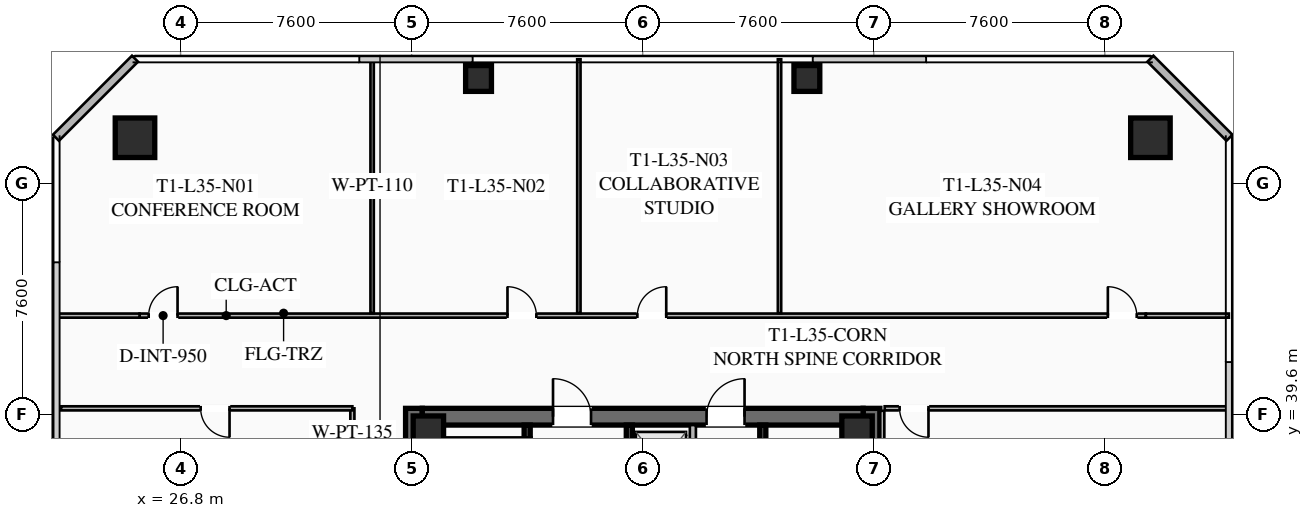
"""IFC4 building model, lengths in metres.
Left out: names, types, materials, properties, quantities, classifications, styles, units other than length and angle.
Written with IfcOpenShell. Run it as: python <this file> out.ifc"""

import sys

from ifc_helpers import new_model, si_unit, direction, frame, frame_2d, origin, origin_2d, place, context, subcontext, project, spatial, rectangle, hollow_rectangle, extrude, element, fill, save


model = new_model("IFC4")
c1 = context("Model", 3, precision=1e-05, world=origin(), true_north=direction((0.0, 1.0)))
c2 = subcontext(c1, "Body", "Model", "MODEL_VIEW")
j1 = project(units=[si_unit("LENGTHUNIT", "METRE"), si_unit("PLANEANGLEUNIT", "RADIAN")], contexts=[c1])
p1 = place(None, origin())
s1 = spatial("IfcSite", under=j1, at=p1, CompositionType="ELEMENT")
p2 = place(p1, origin())
s2 = spatial("IfcBuilding", under=s1, at=p2, CompositionType="ELEMENT")
p3 = place(p2, frame((0.0, 0.0, 132.15)))
s3 = spatial("IfcBuildingStorey", under=s2, at=p3, CompositionType="ELEMENT", Elevation=132.15)
for number, where, z_axis, x_axis in (
    (1, (34.475, 24.2, 0.0), (0.0, 0.0, 1.0), (0.0, 1.0, 0.0)),
    (2, (49.525, 39.8, 0.0), (0.0, 0.0, 1.0), (0.0, -1.0, 0.0)),
):
    element("IfcWall", number, at=place(p3, frame(where, z_axis=z_axis, x_axis=x_axis)), inside=s3, PredefinedType="SHEAR", context=c2, shape_type="SweptSolid", body=[
        extrude(rectangle(XDim=15.6, YDim=0.55, at=frame_2d((7.8, 0.0))), origin(), (0.0, 0.0, 1.0), 3.55),
    ])
p4 = place(p3, frame((34.75, 39.525, 0.0), z_axis=(0.0, 0.0, 1.0), x_axis=(1.0, 0.0, 0.0)))
e3 = element("IfcWall", 3, at=p4, inside=s3, PredefinedType="SHEAR", context=c2, shape_type="SweptSolid", body=[
    extrude(rectangle(XDim=14.5, YDim=0.55, at=frame_2d((7.25, 0.0))), origin(), (0.0, 0.0, 1.0), 3.55),
])
p5 = place(p4, frame((4.3, 0.0, 0.0)))
e4 = element("IfcOpeningElement", 4, at=p5, cuts=e3, PredefinedType="OPENING", context=c2, shape_type="SweptSolid", body=[
    extrude(rectangle(XDim=1.25, YDim=2.25, at=frame_2d((0.625, 1.125))), frame((0.0, 0.285, 0.0), z_axis=(0.0, -1.0, 0.0), x_axis=(1.0, 0.0, 0.0)), (0.0, 0.0, 1.0), 0.57),
])
p6 = place(p4, frame((9.35, 0.0, 0.0)))
e5 = element("IfcOpeningElement", 5, at=p6, cuts=e3, PredefinedType="OPENING", context=c2, shape_type="SweptSolid", body=[
    extrude(rectangle(XDim=1.25, YDim=2.25, at=frame_2d((0.625, 1.125))), frame((0.0, 0.285, 0.0), z_axis=(0.0, -1.0, 0.0), x_axis=(1.0, 0.0, 0.0)), (0.0, 0.0, 1.0), 0.57),
])
for number, where, z_axis, x_axis in (
    (6, (49.05, 39.05, 0.0), (0.0, 0.0, 1.0), (1.0, 0.0, 0.0)),
    (7, (34.95, 39.05, 0.0), (0.0, 0.0, 1.0), (1.0, 0.0, 0.0)),
):
    element("IfcColumn", number, at=place(p3, frame(where, z_axis=z_axis, x_axis=x_axis)), inside=s3, PredefinedType="COLUMN", context=c2, shape_type="SweptSolid", body=[
        extrude(hollow_rectangle(XDim=1.0, YDim=1.0, WallThickness=0.04, at=origin_2d()), origin(), (0.0, 0.0, 1.0), 3.37),
    ])
for number, where, z_axis, x_axis in (
    (8, (58.7, 48.7, 0.0), (0.0, 0.0, 1.0), (1.0, 0.0, 0.0)),
    (9, (25.3, 48.7, 0.0), (0.0, 0.0, 1.0), (1.0, 0.0, 0.0)),
):
    element("IfcColumn", number, at=place(p3, frame(where, z_axis=z_axis, x_axis=x_axis)), inside=s3, PredefinedType="COLUMN", context=c2, shape_type="SweptSolid", body=[
        extrude(hollow_rectangle(XDim=1.3, YDim=1.3, WallThickness=0.05, at=origin_2d()), origin(), (0.0, 0.0, 1.0), 3.37),
    ])
for number, where, z_axis, x_axis in (
    (10, (47.4, 50.65, 0.0), (0.0, 0.0, 1.0), (1.0, 0.0, 0.0)),
    (11, (36.6, 50.65, 0.0), (0.0, 0.0, 1.0), (1.0, 0.0, 0.0)),
):
    element("IfcColumn", number, at=place(p3, frame(where, z_axis=z_axis, x_axis=x_axis)), inside=s3, PredefinedType="COLUMN", context=c2, shape_type="SweptSolid", body=[
        extrude(hollow_rectangle(XDim=0.85, YDim=0.85, WallThickness=0.035, at=origin_2d()), origin(), (0.0, 0.0, 1.0), 3.37),
    ])
for number, where, z_axis, x_axis in (
    (12, (22.7, 48.7, 0.0), (0.0, 0.0, 1.0), (0.707, 0.707, 0.0)),
    (13, (58.7, 51.3, 0.0), (0.0, 0.0, 1.0), (0.707, -0.707, 0.0)),
):
    element("IfcWall", number, at=place(p3, frame(where, z_axis=z_axis, x_axis=x_axis)), inside=s3, PredefinedType="SOLIDWALL", context=c2, shape_type="SweptSolid", body=[
        extrude(rectangle(XDim=3.677, YDim=0.28, at=frame_2d((1.838, 0.0))), origin(), (0.0, 0.0, 1.0), 3.37),
    ])
p7 = place(p3, frame((38.2, 31.2, 0.0), z_axis=(0.0, 0.0, 1.0), x_axis=(0.0, 1.0, 0.0)))
e14 = element("IfcWall", 14, at=p7, inside=s3, PredefinedType="SHEAR", context=c2, shape_type="SweptSolid", body=[
    extrude(rectangle(XDim=8.05, YDim=0.2, at=frame_2d((4.025, 0.0))), origin(), (0.0, 0.0, 1.0), 3.37),
])
p8 = place(p7, frame((0.45, 0.0, 0.0)))
e15 = element("IfcOpeningElement", 15, at=p8, cuts=e14, PredefinedType="OPENING", context=c2, shape_type="SweptSolid", body=[
    extrude(rectangle(XDim=1.15, YDim=2.2, at=frame_2d((0.575, 1.1))), frame((0.0, 0.11, 0.0), z_axis=(0.0, -1.0, 0.0), x_axis=(1.0, 0.0, 0.0)), (0.0, 0.0, 1.0), 0.22),
])
p9 = place(p3, frame((41.56, 24.75, 0.0), z_axis=(0.0, 0.0, 1.0), x_axis=(0.0, 1.0, 0.0)))
e16 = element("IfcWall", 16, at=p9, inside=s3, PredefinedType="SHEAR", context=c2, shape_type="SweptSolid", body=[
    extrude(rectangle(XDim=14.5, YDim=0.2, at=frame_2d((7.25, 0.0))), origin(), (0.0, 0.0, 1.0), 3.37),
])
p10 = place(p3, frame((45.95, 39.25, 0.0), z_axis=(0.0, 0.0, 1.0), x_axis=(0.0, -1.0, 0.0)))
e17 = element("IfcWall", 17, at=p10, inside=s3, PredefinedType="SHEAR", context=c2, shape_type="SweptSolid", body=[
    extrude(rectangle(XDim=6.45, YDim=0.2, at=frame_2d((3.225, 0.0))), origin(), (0.0, 0.0, 1.0), 3.37),
])
p11 = place(p3, frame((43.65, 32.35, 0.0), z_axis=(0.0, 0.0, 1.0), x_axis=(0.0, 1.0, 0.0)))
e18 = element("IfcWall", 18, at=p11, inside=s3, PredefinedType="SOLIDWALL", context=c2, shape_type="SweptSolid", body=[
    extrude(rectangle(XDim=6.9, YDim=0.2, at=frame_2d((3.45, 0.0))), origin(), (0.0, 0.0, 1.0), 3.37),
])
p12 = place(p11, frame((0.575, 0.0, 0.0)))
e19 = element("IfcOpeningElement", 19, at=p12, cuts=e18, PredefinedType="OPENING", context=c2, shape_type="SweptSolid", body=[
    extrude(rectangle(XDim=1.1, YDim=2.2, at=frame_2d((0.55, 1.1))), frame((0.0, 0.11, 0.0), z_axis=(0.0, -1.0, 0.0), x_axis=(1.0, 0.0, 0.0)), (0.0, 0.0, 1.0), 0.22),
])
p13 = place(p11, frame((2.825, 0.0, 0.0)))
e20 = element("IfcOpeningElement", 20, at=p13, cuts=e18, PredefinedType="OPENING", context=c2, shape_type="SweptSolid", body=[
    extrude(rectangle(XDim=1.1, YDim=2.2, at=frame_2d((0.55, 1.1))), frame((0.0, 0.11, 0.0), z_axis=(0.0, -1.0, 0.0), x_axis=(1.0, 0.0, 0.0)), (0.0, 0.0, 1.0), 0.22),
])
p14 = place(p11, frame((5.075, 0.0, 0.0)))
e21 = element("IfcOpeningElement", 21, at=p14, cuts=e18, PredefinedType="OPENING", context=c2, shape_type="SweptSolid", body=[
    extrude(rectangle(XDim=1.1, YDim=2.2, at=frame_2d((0.55, 1.1))), frame((0.0, 0.11, 0.0), z_axis=(0.0, -1.0, 0.0), x_axis=(1.0, 0.0, 0.0)), (0.0, 0.0, 1.0), 0.22),
])
p15 = place(p3, frame((32.45, 35.4, 0.0), z_axis=(0.0, 0.0, 1.0), x_axis=(0.0, 1.0, 0.0)))
e22 = element("IfcWall", 22, at=p15, inside=s3, PredefinedType="PARTITIONING", context=c2, shape_type="SweptSolid", body=[
    extrude(rectangle(XDim=4.4, YDim=0.135, at=frame_2d((2.2, 0.0))), origin(), (0.0, 0.0, 1.0), 2.723),
])
p16 = place(p3, frame((25.45, 42.85, 0.0), z_axis=(0.0, 0.0, 1.0), x_axis=(1.0, 0.0, 0.0)))
e23 = element("IfcWall", 23, at=p16, inside=s3, PredefinedType="PARTITIONING", context=c2, shape_type="SweptSolid", body=[
    extrude(rectangle(XDim=33.1, YDim=0.135, at=frame_2d((16.55, 0.0))), origin(), (0.0, 0.0, 1.0), 2.723),
])
p17 = place(p16, frame((0.3, 0.0, 0.0)))
e24 = element("IfcOpeningElement", 24, at=p17, cuts=e23, PredefinedType="OPENING", context=c2, shape_type="SweptSolid", body=[
    extrude(rectangle(XDim=0.95, YDim=2.05, at=frame_2d((0.475, 1.025))), frame((0.0, 0.077, 0.0), z_axis=(0.0, -1.0, 0.0), x_axis=(1.0, 0.0, 0.0)), (0.0, 0.0, 1.0), 0.155),
])
p18 = place(p16, frame((12.102, 0.0, 0.0)))
e25 = element("IfcOpeningElement", 25, at=p18, cuts=e23, PredefinedType="OPENING", context=c2, shape_type="SweptSolid", body=[
    extrude(rectangle(XDim=0.95, YDim=2.05, at=frame_2d((0.475, 1.025))), frame((0.0, 0.077, 0.0), z_axis=(0.0, -1.0, 0.0), x_axis=(1.0, 0.0, 0.0)), (0.0, 0.0, 1.0), 0.155),
])
p19 = place(p16, frame((16.374, 0.0, 0.0)))
e26 = element("IfcOpeningElement", 26, at=p19, cuts=e23, PredefinedType="OPENING", context=c2, shape_type="SweptSolid", body=[
    extrude(rectangle(XDim=0.95, YDim=2.05, at=frame_2d((0.475, 1.025))), frame((0.0, 0.077, 0.0), z_axis=(0.0, -1.0, 0.0), x_axis=(1.0, 0.0, 0.0)), (0.0, 0.0, 1.0), 0.155),
])
p20 = place(p16, frame((31.85, 0.0, 0.0)))
e27 = element("IfcOpeningElement", 27, at=p20, cuts=e23, PredefinedType="OPENING", context=c2, shape_type="SweptSolid", body=[
    extrude(rectangle(XDim=0.95, YDim=2.05, at=frame_2d((0.475, 1.025))), frame((0.0, 0.077, 0.0), z_axis=(0.0, -1.0, 0.0), x_axis=(1.0, 0.0, 0.0)), (0.0, 0.0, 1.0), 0.155),
])
for number, where, z_axis, x_axis in (
    (28, (22.72, 42.85, 0.0), (0.0, 0.0, 1.0), (1.0, 0.0, 0.0)),
    (29, (58.55, 42.85, 0.0), (0.0, 0.0, 1.0), (1.0, 0.0, 0.0)),
):
    element("IfcWall", number, at=place(p3, frame(where, z_axis=z_axis, x_axis=x_axis)), inside=s3, PredefinedType="PARTITIONING", context=c2, shape_type="SweptSolid", body=[
        extrude(rectangle(XDim=2.73, YDim=0.135, at=frame_2d((1.365, 0.0))), origin(), (0.0, 0.0, 1.0), 2.723),
    ])
for number, where, z_axis, x_axis in (
    (30, (33.1, 42.93, 0.0), (0.0, 0.0, 1.0), (0.0, 1.0, 0.0)),
    (31, (39.9, 42.93, 0.0), (0.0, 0.0, 1.0), (0.0, 1.0, 0.0)),
    (32, (46.5, 42.93, 0.0), (0.0, 0.0, 1.0), (0.0, 1.0, 0.0)),
):
    element("IfcWall", number, at=place(p3, frame(where, z_axis=z_axis, x_axis=x_axis)), inside=s3, PredefinedType="PARTITIONING", context=c2, shape_type="SweptSolid", body=[
        extrude(rectangle(XDim=8.35, YDim=0.11, at=frame_2d((4.175, 0.0))), origin(), (0.0, 0.0, 1.0), 2.723),
    ])
p21 = place(p3, frame((49.88, 39.72, 0.0), z_axis=(0.0, 0.0, 1.0), x_axis=(0.0, -1.0, 0.0)))
e33 = element("IfcWall", 33, at=p21, inside=s3, PredefinedType="PARTITIONING", context=c2, shape_type="SweptSolid", body=[
    extrude(rectangle(XDim=15.44, YDim=0.135, at=frame_2d((7.72, 0.0))), origin(), (0.0, 0.0, 1.0), 2.723),
])
p22 = place(p3, frame((61.28, 39.8, 0.0), z_axis=(0.0, 0.0, 1.0), x_axis=(-1.0, 0.0, 0.0)))
e34 = element("IfcWall", 34, at=p22, inside=s3, PredefinedType="PARTITIONING", context=c2, shape_type="SweptSolid", body=[
    extrude(rectangle(XDim=11.32, YDim=0.135, at=frame_2d((5.66, 0.0))), origin(), (0.0, 0.0, 1.0), 2.723),
])
p23 = place(p22, frame((9.88, 0.0, 0.0)))
e35 = element("IfcOpeningElement", 35, at=p23, cuts=e34, PredefinedType="OPENING", context=c2, shape_type="SweptSolid", body=[
    extrude(rectangle(XDim=0.95, YDim=2.05, at=frame_2d((0.475, 1.025))), frame((0.0, 0.077, 0.0), z_axis=(0.0, -1.0, 0.0), x_axis=(1.0, 0.0, 0.0)), (0.0, 0.0, 1.0), 0.155),
])
p24 = place(p3, frame((32.45, 39.8, 0.0), z_axis=(0.0, 0.0, 1.0), x_axis=(-1.0, 0.0, 0.0)))
e36 = element("IfcWall", 36, at=p24, inside=s3, PredefinedType="PARTITIONING", context=c2, shape_type="SweptSolid", body=[
    extrude(rectangle(XDim=9.58, YDim=0.135, at=frame_2d((4.79, 0.0))), origin(), (0.0, 0.0, 1.0), 2.723),
])
p25 = place(p24, frame((4.04, 0.0, 0.0)))
e37 = element("IfcOpeningElement", 37, at=p25, cuts=e36, PredefinedType="OPENING", context=c2, shape_type="SweptSolid", body=[
    extrude(rectangle(XDim=0.95, YDim=2.05, at=frame_2d((0.475, 1.025))), frame((0.0, 0.077, 0.0), z_axis=(0.0, -1.0, 0.0), x_axis=(1.0, 0.0, 0.0)), (0.0, 0.0, 1.0), 0.155),
])
p26 = place(p5, origin())
e38 = element("IfcDoor", 38, at=p26, inside=s3, OperationType="SINGLE_SWING_LEFT", PredefinedType="DOOR", context=c2, shape_type="SweptSolid", body=[
    extrude(rectangle(XDim=1.25, YDim=2.25, at=frame_2d((0.625, 1.125))), frame((0.0, 0.025, 0.0), z_axis=(0.0, -1.0, 0.0), x_axis=(1.0, 0.0, 0.0)), (0.0, 0.0, 1.0), 0.05),
])
fill(e4, e38)
p27 = place(p6, origin())
e39 = element("IfcDoor", 39, at=p27, inside=s3, OperationType="SINGLE_SWING_RIGHT", PredefinedType="DOOR", context=c2, shape_type="SweptSolid", body=[
    extrude(rectangle(XDim=1.25, YDim=2.25, at=frame_2d((0.625, 1.125))), frame((0.0, 0.025, 0.0), z_axis=(0.0, -1.0, 0.0), x_axis=(1.0, 0.0, 0.0)), (0.0, 0.0, 1.0), 0.05),
])
fill(e5, e39)
p28 = place(p17, origin())
e40 = element("IfcDoor", 40, at=p28, inside=s3, OperationType="SINGLE_SWING_RIGHT", PredefinedType="DOOR", context=c2, shape_type="SweptSolid", body=[
    extrude(rectangle(XDim=0.95, YDim=2.05, at=frame_2d((0.475, 1.025))), frame((0.0, 0.025, 0.0), z_axis=(0.0, -1.0, 0.0), x_axis=(1.0, 0.0, 0.0)), (0.0, 0.0, 1.0), 0.05),
])
fill(e24, e40)
p29 = place(p18, origin())
e41 = element("IfcDoor", 41, at=p29, inside=s3, OperationType="SINGLE_SWING_LEFT", PredefinedType="DOOR", context=c2, shape_type="SweptSolid", body=[
    extrude(rectangle(XDim=0.95, YDim=2.05, at=frame_2d((0.475, 1.025))), frame((0.0, 0.025, 0.0), z_axis=(0.0, -1.0, 0.0), x_axis=(1.0, 0.0, 0.0)), (0.0, 0.0, 1.0), 0.05),
])
fill(e25, e41)
p30 = place(p19, origin())
e42 = element("IfcDoor", 42, at=p30, inside=s3, OperationType="SINGLE_SWING_RIGHT", PredefinedType="DOOR", context=c2, shape_type="SweptSolid", body=[
    extrude(rectangle(XDim=0.95, YDim=2.05, at=frame_2d((0.475, 1.025))), frame((0.0, 0.025, 0.0), z_axis=(0.0, -1.0, 0.0), x_axis=(1.0, 0.0, 0.0)), (0.0, 0.0, 1.0), 0.05),
])
fill(e26, e42)
p31 = place(p20, origin())
e43 = element("IfcDoor", 43, at=p31, inside=s3, OperationType="SINGLE_SWING_LEFT", PredefinedType="DOOR", context=c2, shape_type="SweptSolid", body=[
    extrude(rectangle(XDim=0.95, YDim=2.05, at=frame_2d((0.475, 1.025))), frame((0.0, 0.025, 0.0), z_axis=(0.0, -1.0, 0.0), x_axis=(1.0, 0.0, 0.0)), (0.0, 0.0, 1.0), 0.05),
])
fill(e27, e43)
p32 = place(p23, origin())
e44 = element("IfcDoor", 44, at=p32, inside=s3, OperationType="SINGLE_SWING_LEFT", PredefinedType="DOOR", context=c2, shape_type="SweptSolid", body=[
    extrude(rectangle(XDim=0.95, YDim=2.05, at=frame_2d((0.475, 1.025))), frame((0.0, 0.025, 0.0), z_axis=(0.0, -1.0, 0.0), x_axis=(1.0, 0.0, 0.0)), (0.0, 0.0, 1.0), 0.05),
])
fill(e35, e44)
p33 = place(p25, origin())
e45 = element("IfcDoor", 45, at=p33, inside=s3, OperationType="SINGLE_SWING_LEFT", PredefinedType="DOOR", context=c2, shape_type="SweptSolid", body=[
    extrude(rectangle(XDim=0.95, YDim=2.05, at=frame_2d((0.475, 1.025))), frame((0.0, 0.025, 0.0), z_axis=(0.0, -1.0, 0.0), x_axis=(1.0, 0.0, 0.0)), (0.0, 0.0, 1.0), 0.05),
])
fill(e37, e45)
save(model, sys.argv[1])
